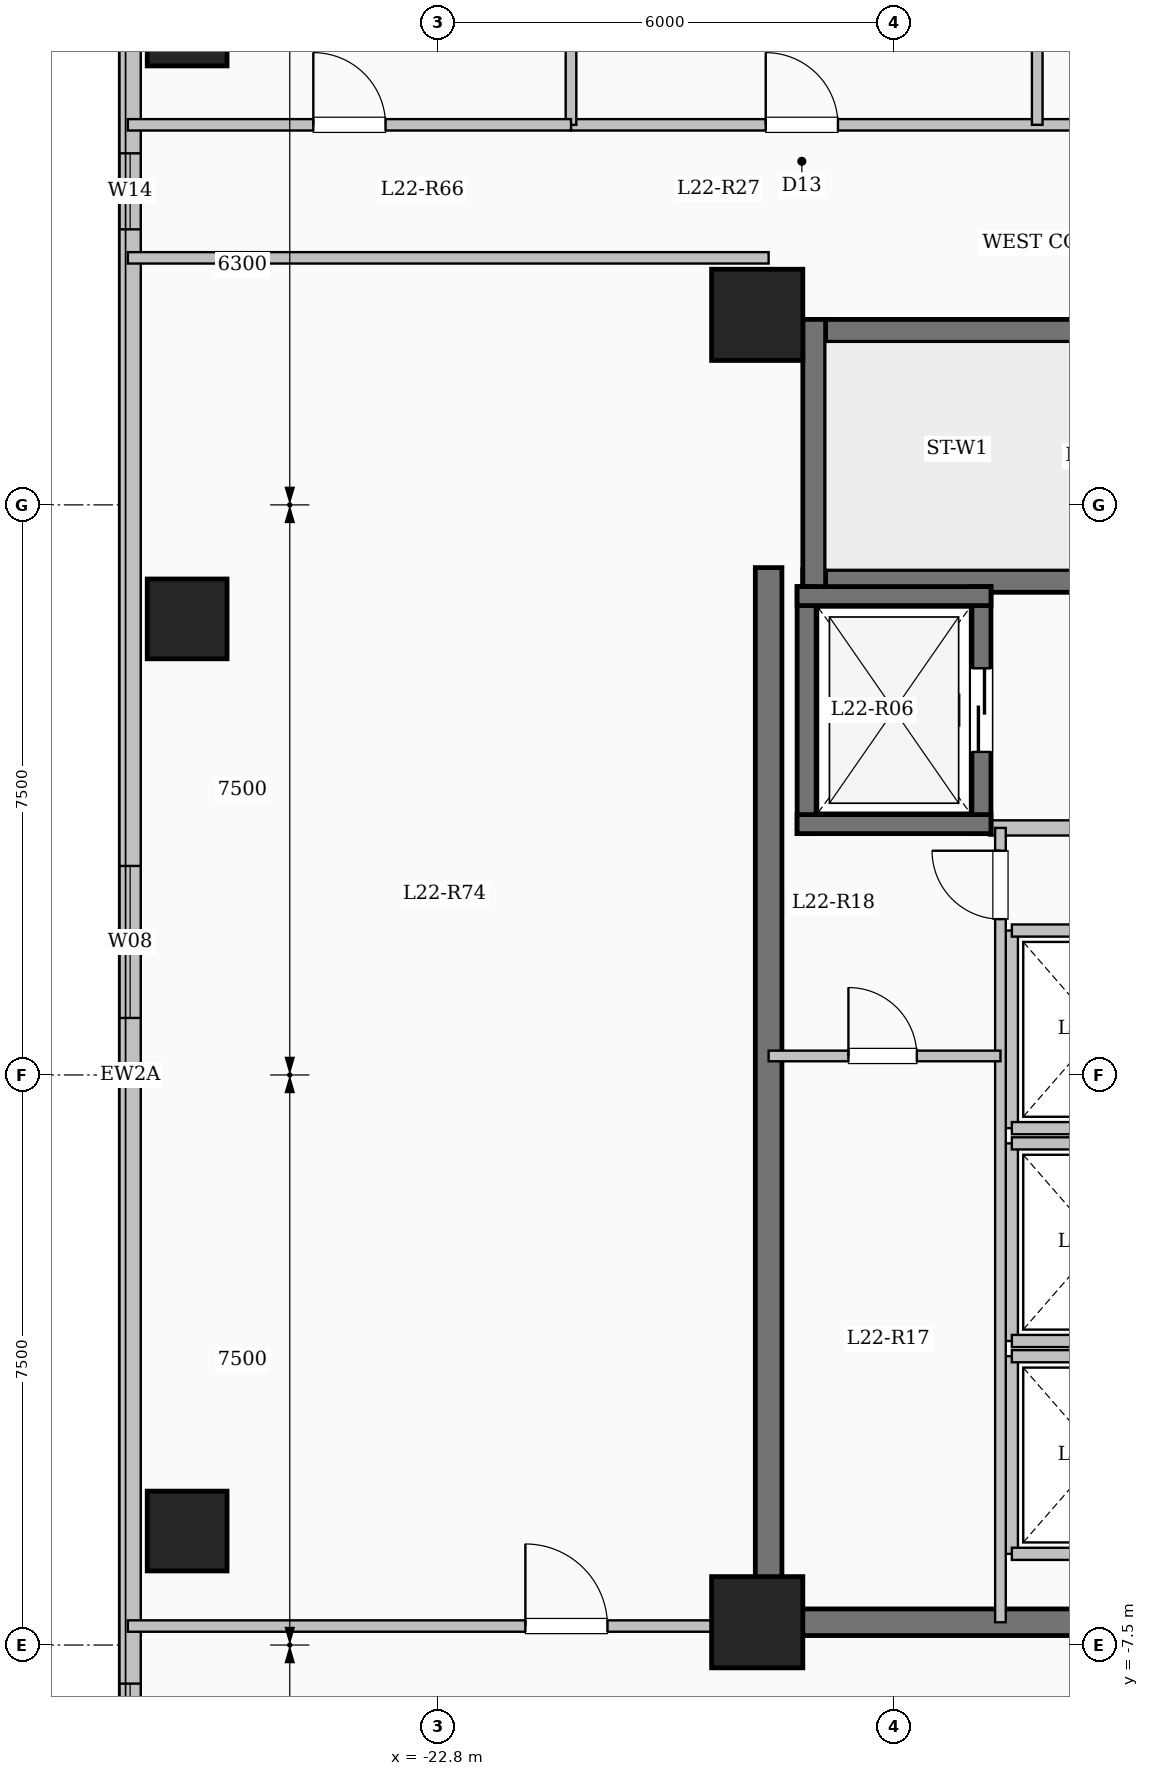
"""IFC4 building model, lengths in metres.
Left out: names, types, materials, properties, quantities, classifications, styles, units other than length and angle.
Written with IfcOpenShell. Run it as: python <this file> out.ifc"""

import sys

from ifc_helpers import new_model, si_unit, direction, frame, frame_2d, origin, origin_2d, place, context, subcontext, project, spatial, rectangle, extrude, element, fill, save


model = new_model("IFC4")
c1 = context("Model", 3, precision=1e-05, world=origin(), true_north=direction((0.0, 1.0)))
c2 = subcontext(c1, "Body", "Model", "MODEL_VIEW")
j1 = project(units=[si_unit("LENGTHUNIT", "METRE"), si_unit("PLANEANGLEUNIT", "RADIAN")], contexts=[c1])
p1 = place(None, origin())
s1 = spatial("IfcSite", under=j1, at=p1, CompositionType="ELEMENT")
p2 = place(p1, origin())
s2 = spatial("IfcBuilding", under=s1, at=p2, CompositionType="ELEMENT")
p3 = place(p2, frame((0.0, 0.0, 85.0)))
s3 = spatial("IfcBuildingStorey", under=s2, at=p3, CompositionType="ELEMENT", Elevation=85.0)
for number, where, z_axis, x_axis in (
    (1, (-18.6, -7.2, 0.0), (0.0, 0.0, 1.0), (1.0, 0.0, 0.0)),
    (2, (-18.6, 10.0, 0.0), (0.0, 0.0, 1.0), (1.0, 0.0, 0.0)),
):
    element("IfcColumn", number, at=place(p3, frame(where, z_axis=z_axis, x_axis=x_axis)), inside=s3, PredefinedType="COLUMN", context=c2, shape_type="SweptSolid", body=[
        extrude(rectangle(XDim=1.2, YDim=1.2, at=origin_2d()), origin(), (0.0, 0.0, 1.0), 3.35),
    ])
for number, where, z_axis, x_axis in (
    (3, (-26.1, -6.0, 0.0), (0.0, 0.0, 1.0), (1.0, 0.0, 0.0)),
    (4, (-26.1, 6.0, 0.0), (0.0, 0.0, 1.0), (1.0, 0.0, 0.0)),
    (5, (-26.1, 13.8, 0.0), (0.0, 0.0, 1.0), (1.0, 0.0, 0.0)),
):
    element("IfcColumn", number, at=place(p3, frame(where, z_axis=z_axis, x_axis=x_axis)), inside=s3, PredefinedType="COLUMN", context=c2, shape_type="SweptSolid", body=[
        extrude(rectangle(XDim=1.05, YDim=1.05, at=origin_2d()), origin(), (0.0, 0.0, 1.0), 3.35),
    ])
p4 = place(p3, frame((-26.85, -17.85, 0.0), z_axis=(0.0, 0.0, 1.0), x_axis=(0.0, 1.0, 0.0)))
e6 = element("IfcWall", 6, at=p4, inside=s3, PredefinedType="SOLIDWALL", context=c2, shape_type="SweptSolid", body=[
    extrude(rectangle(XDim=35.7, YDim=0.28, at=frame_2d((17.85, 0.0))), origin(), (0.0, 0.0, 1.0), 3.1),
])
p5 = place(p4, frame((2.55, 0.0, 0.9)))
e7 = element("IfcOpeningElement", 7, at=p5, cuts=e6, PredefinedType="OPENING", context=c2, shape_type="SweptSolid", body=[
    extrude(rectangle(XDim=2.4, YDim=1.8, at=frame_2d((1.2, 0.9))), frame((0.0, 0.15, 0.0), z_axis=(0.0, -1.0, 0.0), x_axis=(1.0, 0.0, 0.0)), (0.0, 0.0, 1.0), 0.3),
])
p6 = place(p4, frame((8.343, 0.0, 0.9)))
e8 = element("IfcOpeningElement", 8, at=p6, cuts=e6, PredefinedType="OPENING", context=c2, shape_type="SweptSolid", body=[
    extrude(rectangle(XDim=1.5, YDim=1.65, at=frame_2d((0.75, 0.825))), frame((0.0, 0.15, 0.0), z_axis=(0.0, -1.0, 0.0), x_axis=(1.0, 0.0, 0.0)), (0.0, 0.0, 1.0), 0.3),
])
p7 = place(p4, frame((18.6, 0.0, 0.9)))
e9 = element("IfcOpeningElement", 9, at=p7, cuts=e6, PredefinedType="OPENING", context=c2, shape_type="SweptSolid", body=[
    extrude(rectangle(XDim=2.0, YDim=1.7, at=frame_2d((1.0, 0.85))), frame((0.0, 0.15, 0.0), z_axis=(0.0, -1.0, 0.0), x_axis=(1.0, 0.0, 0.0)), (0.0, 0.0, 1.0), 0.3),
])
p8 = place(p4, frame((28.975, 0.0, 0.95)))
e10 = element("IfcOpeningElement", 10, at=p8, cuts=e6, PredefinedType="OPENING", context=c2, shape_type="SweptSolid", body=[
    extrude(rectangle(XDim=1.0, YDim=1.5, at=frame_2d((0.5, 0.75))), frame((0.0, 0.15, 0.0), z_axis=(0.0, -1.0, 0.0), x_axis=(1.0, 0.0, 0.0)), (0.0, 0.0, 1.0), 0.3),
])
p9 = place(p4, frame((32.025, 0.0, 0.9)))
e11 = element("IfcOpeningElement", 11, at=p9, cuts=e6, PredefinedType="OPENING", context=c2, shape_type="SweptSolid", body=[
    extrude(rectangle(XDim=2.0, YDim=1.7, at=frame_2d((1.0, 0.85))), frame((0.0, 0.15, 0.0), z_axis=(0.0, -1.0, 0.0), x_axis=(1.0, 0.0, 0.0)), (0.0, 0.0, 1.0), 0.3),
])
p10 = place(p3, frame((-18.0, 9.79, 0.0), z_axis=(0.0, 0.0, 1.0), x_axis=(1.0, 0.0, 0.0)))
e12 = element("IfcWall", 12, at=p10, inside=s3, PredefinedType="SHEAR", context=c2, shape_type="SweptSolid", body=[
    extrude(rectangle(XDim=8.0, YDim=0.3, at=frame_2d((4.0, 0.0))), origin(), (0.0, 0.0, 1.0), 3.35),
])
p11 = place(p3, frame((-18.0, 6.5, 0.0), z_axis=(0.0, 0.0, 1.0), x_axis=(1.0, 0.0, 0.0)))
e13 = element("IfcWall", 13, at=p11, inside=s3, PredefinedType="SHEAR", context=c2, shape_type="SweptSolid", body=[
    extrude(rectangle(XDim=8.0, YDim=0.3, at=frame_2d((4.0, 0.0))), origin(), (0.0, 0.0, 1.0), 3.35),
])
p12 = place(p11, frame((6.45, 0.0, 0.0)))
e14 = element("IfcOpeningElement", 14, at=p12, cuts=e13, PredefinedType="OPENING", context=c2, shape_type="SweptSolid", body=[
    extrude(rectangle(XDim=1.0, YDim=2.15, at=frame_2d((0.5, 1.075))), frame((0.0, 0.16, 0.0), z_axis=(0.0, -1.0, 0.0), x_axis=(1.0, 0.0, 0.0)), (0.0, 0.0, 1.0), 0.32),
])
p13 = place(p3, frame((-17.85, 6.35, 0.0), z_axis=(0.0, 0.0, 1.0), x_axis=(0.0, 1.0, 0.0)))
e15 = element("IfcWall", 15, at=p13, inside=s3, PredefinedType="SHEAR", context=c2, shape_type="SweptSolid", body=[
    extrude(rectangle(XDim=3.59, YDim=0.3, at=frame_2d((1.795, 0.0))), origin(), (0.0, 0.0, 1.0), 3.35),
])
p14 = place(p3, frame((-15.55, 3.25, 0.0), z_axis=(0.0, 0.0, 1.0), x_axis=(1.0, 0.0, 0.0)))
e16 = element("IfcWall", 16, at=p14, inside=s3, PredefinedType="SOLIDWALL", context=c2, shape_type="SweptSolid", body=[
    extrude(rectangle(XDim=5.4, YDim=0.2, at=frame_2d((2.7, 0.0))), origin(), (0.0, 0.0, 1.0), 3.1),
])
p15 = place(p3, frame((-17.95, 3.175, 0.0), z_axis=(0.0, 0.0, 1.0), x_axis=(0.0, 1.0, 0.0)))
e17 = element("IfcWall", 17, at=p15, inside=s3, PredefinedType="SHEAR", context=c2, shape_type="SweptSolid", body=[
    extrude(rectangle(XDim=3.25, YDim=0.25, at=frame_2d((1.625, 0.0))), origin(), (0.0, 0.0, 1.0), 3.35),
])
p16 = place(p3, frame((-15.65, 3.175, 0.0), z_axis=(0.0, 0.0, 1.0), x_axis=(0.0, 1.0, 0.0)))
e18 = element("IfcWall", 18, at=p16, inside=s3, PredefinedType="SHEAR", context=c2, shape_type="SweptSolid", body=[
    extrude(rectangle(XDim=3.25, YDim=0.25, at=frame_2d((1.625, 0.0))), origin(), (0.0, 0.0, 1.0), 3.35),
])
p17 = place(p16, frame((1.075, 0.0, 0.0)))
e19 = element("IfcOpeningElement", 19, at=p17, cuts=e18, PredefinedType="OPENING", context=c2, shape_type="SweptSolid", body=[
    extrude(rectangle(XDim=1.1, YDim=2.15, at=frame_2d((0.55, 1.075))), frame((0.0, 0.135, 0.0), z_axis=(0.0, -1.0, 0.0), x_axis=(1.0, 0.0, 0.0)), (0.0, 0.0, 1.0), 0.27),
])
for number, where, z_axis, x_axis in (
    (20, (-18.075, 3.3, 0.0), (0.0, 0.0, 1.0), (1.0, 0.0, 0.0)),
    (21, (-18.075, 6.3, 0.0), (0.0, 0.0, 1.0), (1.0, 0.0, 0.0)),
):
    element("IfcWall", number, at=place(p3, frame(where, z_axis=z_axis, x_axis=x_axis)), inside=s3, PredefinedType="SHEAR", context=c2, shape_type="SweptSolid", body=[
        extrude(rectangle(XDim=2.55, YDim=0.25, at=frame_2d((1.275, 0.0))), origin(), (0.0, 0.0, 1.0), 3.35),
    ])
p18 = place(p3, frame((-15.25, -6.3, 0.0), z_axis=(0.0, 0.0, 1.0), x_axis=(0.0, 1.0, 0.0)))
e22 = element("IfcWall", 22, at=p18, inside=s3, PredefinedType="SOLIDWALL", context=c2, shape_type="SweptSolid", body=[
    extrude(rectangle(XDim=2.6, YDim=0.16, at=frame_2d((1.3, 0.0))), origin(), (0.0, 0.0, 1.0), 3.1),
])
for number, where, z_axis, x_axis in (
    (23, (-15.25, -6.3, 0.0), (0.0, 0.0, 1.0), (1.0, 0.0, 0.0)),
    (24, (-15.25, -3.7, 0.0), (0.0, 0.0, 1.0), (1.0, 0.0, 0.0)),
):
    element("IfcWall", number, at=place(p3, frame(where, z_axis=z_axis, x_axis=x_axis)), inside=s3, PredefinedType="SOLIDWALL", context=c2, shape_type="SweptSolid", body=[
        extrude(rectangle(XDim=2.3, YDim=0.16, at=frame_2d((1.15, 0.0))), origin(), (0.0, 0.0, 1.0), 3.1),
    ])
p19 = place(p3, frame((-15.25, -3.5, 0.0), z_axis=(0.0, 0.0, 1.0), x_axis=(0.0, 1.0, 0.0)))
e25 = element("IfcWall", 25, at=p19, inside=s3, PredefinedType="SOLIDWALL", context=c2, shape_type="SweptSolid", body=[
    extrude(rectangle(XDim=2.6, YDim=0.16, at=frame_2d((1.3, 0.0))), origin(), (0.0, 0.0, 1.0), 3.1),
])
for number, where, z_axis, x_axis in (
    (26, (-15.25, -3.5, 0.0), (0.0, 0.0, 1.0), (1.0, 0.0, 0.0)),
    (27, (-15.25, -0.9, 0.0), (0.0, 0.0, 1.0), (1.0, 0.0, 0.0)),
):
    element("IfcWall", number, at=place(p3, frame(where, z_axis=z_axis, x_axis=x_axis)), inside=s3, PredefinedType="SOLIDWALL", context=c2, shape_type="SweptSolid", body=[
        extrude(rectangle(XDim=2.3, YDim=0.16, at=frame_2d((1.15, 0.0))), origin(), (0.0, 0.0, 1.0), 3.1),
    ])
p20 = place(p3, frame((-15.25, -0.7, 0.0), z_axis=(0.0, 0.0, 1.0), x_axis=(0.0, 1.0, 0.0)))
e28 = element("IfcWall", 28, at=p20, inside=s3, PredefinedType="SOLIDWALL", context=c2, shape_type="SweptSolid", body=[
    extrude(rectangle(XDim=2.6, YDim=0.16, at=frame_2d((1.3, 0.0))), origin(), (0.0, 0.0, 1.0), 3.1),
])
for number, where, z_axis, x_axis in (
    (29, (-15.25, -0.7, 0.0), (0.0, 0.0, 1.0), (1.0, 0.0, 0.0)),
    (30, (-15.25, 1.9, 0.0), (0.0, 0.0, 1.0), (1.0, 0.0, 0.0)),
):
    element("IfcWall", number, at=place(p3, frame(where, z_axis=z_axis, x_axis=x_axis)), inside=s3, PredefinedType="SOLIDWALL", context=c2, shape_type="SweptSolid", body=[
        extrude(rectangle(XDim=2.3, YDim=0.16, at=frame_2d((1.15, 0.0))), origin(), (0.0, 0.0, 1.0), 3.1),
    ])
p21 = place(p3, frame((-18.45, -7.375, 0.0), z_axis=(0.0, 0.0, 1.0), x_axis=(0.0, 1.0, 0.0)))
e31 = element("IfcWall", 31, at=p21, inside=s3, PredefinedType="SHEAR", context=c2, shape_type="SweptSolid", body=[
    extrude(rectangle(XDim=14.05, YDim=0.35, at=frame_2d((7.025, 0.0))), origin(), (0.0, 0.0, 1.0), 3.35),
])
p22 = place(p3, frame((-18.625, -7.2, 0.0), z_axis=(0.0, 0.0, 1.0), x_axis=(1.0, 0.0, 0.0)))
e32 = element("IfcWall", 32, at=p22, inside=s3, PredefinedType="SHEAR", context=c2, shape_type="SweptSolid", body=[
    extrude(rectangle(XDim=8.55, YDim=0.35, at=frame_2d((4.275, 0.0))), origin(), (0.0, 0.0, 1.0), 3.35),
])
p23 = place(p3, frame((-15.4, -7.2, 0.0), z_axis=(0.0, 0.0, 1.0), x_axis=(0.0, 1.0, 0.0)))
e33 = element("IfcWall", 33, at=p23, inside=s3, PredefinedType="PARTITIONING", context=c2, shape_type="SweptSolid", body=[
    extrude(rectangle(XDim=10.45, YDim=0.14, at=frame_2d((5.225, 0.0))), origin(), (0.0, 0.0, 1.0), 3.1),
])
p24 = place(p23, frame((9.25, 0.0, 0.0)))
e34 = element("IfcOpeningElement", 34, at=p24, cuts=e33, PredefinedType="OPENING", context=c2, shape_type="SweptSolid", body=[
    extrude(rectangle(XDim=0.9, YDim=2.08, at=frame_2d((0.45, 1.04))), frame((0.0, 0.08, 0.0), z_axis=(0.0, -1.0, 0.0), x_axis=(1.0, 0.0, 0.0)), (0.0, 0.0, 1.0), 0.16),
])
p25 = place(p3, frame((-18.45, 0.25, 0.0), z_axis=(0.0, 0.0, 1.0), x_axis=(1.0, 0.0, 0.0)))
e35 = element("IfcWall", 35, at=p25, inside=s3, PredefinedType="PARTITIONING", context=c2, shape_type="SweptSolid", body=[
    extrude(rectangle(XDim=3.05, YDim=0.14, at=frame_2d((1.525, 0.0))), origin(), (0.0, 0.0, 1.0), 3.1),
])
p26 = place(p25, frame((1.05, 0.0, 0.0)))
e36 = element("IfcOpeningElement", 36, at=p26, cuts=e35, PredefinedType="OPENING", context=c2, shape_type="SweptSolid", body=[
    extrude(rectangle(XDim=0.9, YDim=2.08, at=frame_2d((0.45, 1.04))), frame((0.0, 0.08, 0.0), z_axis=(0.0, -1.0, 0.0), x_axis=(1.0, 0.0, 0.0)), (0.0, 0.0, 1.0), 0.16),
])
p27 = place(p3, frame((-21.05, 12.5, 0.0), z_axis=(0.0, 0.0, 1.0), x_axis=(1.0, 0.0, 0.0)))
e37 = element("IfcWall", 37, at=p27, inside=s3, PredefinedType="PARTITIONING", context=c2, shape_type="SweptSolid", body=[
    extrude(rectangle(XDim=17.2, YDim=0.15, at=frame_2d((8.6, 0.0))), origin(), (0.0, 0.0, 1.0), 3.1),
])
p28 = place(p27, frame((2.562, 0.0, 0.0)))
e38 = element("IfcOpeningElement", 38, at=p28, cuts=e37, PredefinedType="OPENING", context=c2, shape_type="SweptSolid", body=[
    extrude(rectangle(XDim=0.95, YDim=2.15, at=frame_2d((0.475, 1.075))), frame((0.0, 0.085, 0.0), z_axis=(0.0, -1.0, 0.0), x_axis=(1.0, 0.0, 0.0)), (0.0, 0.0, 1.0), 0.17),
])
p29 = place(p27, frame((8.726, 0.0, 0.0)))
e39 = element("IfcOpeningElement", 39, at=p29, cuts=e37, PredefinedType="OPENING", context=c2, shape_type="SweptSolid", body=[
    extrude(rectangle(XDim=0.95, YDim=2.15, at=frame_2d((0.475, 1.075))), frame((0.0, 0.085, 0.0), z_axis=(0.0, -1.0, 0.0), x_axis=(1.0, 0.0, 0.0)), (0.0, 0.0, 1.0), 0.17),
])
p30 = place(p27, frame((14.21, 0.0, 0.0)))
e40 = element("IfcOpeningElement", 40, at=p30, cuts=e37, PredefinedType="OPENING", context=c2, shape_type="SweptSolid", body=[
    extrude(rectangle(XDim=0.95, YDim=2.15, at=frame_2d((0.475, 1.075))), frame((0.0, 0.085, 0.0), z_axis=(0.0, -1.0, 0.0), x_axis=(1.0, 0.0, 0.0)), (0.0, 0.0, 1.0), 0.17),
])
p31 = place(p3, frame((-14.916, 12.5, 0.0), z_axis=(0.0, 0.0, 1.0), x_axis=(0.0, 1.0, 0.0)))
e41 = element("IfcWall", 41, at=p31, inside=s3, PredefinedType="PARTITIONING", context=c2, shape_type="SweptSolid", body=[
    extrude(rectangle(XDim=9.55, YDim=0.14, at=frame_2d((4.775, 0.0))), origin(), (0.0, 0.0, 1.0), 2.435),
])
p32 = place(p3, frame((-26.88, -7.25, 0.0), z_axis=(0.0, 0.0, 1.0), x_axis=(1.0, 0.0, 0.0)))
e42 = element("IfcWall", 42, at=p32, inside=s3, PredefinedType="PARTITIONING", context=c2, shape_type="SweptSolid", body=[
    extrude(rectangle(XDim=8.43, YDim=0.15, at=frame_2d((4.215, 0.0))), origin(), (0.0, 0.0, 1.0), 3.1),
])
p33 = place(p32, frame((5.23, 0.0, 0.0)))
e43 = element("IfcOpeningElement", 43, at=p33, cuts=e42, PredefinedType="OPENING", context=c2, shape_type="SweptSolid", body=[
    extrude(rectangle(XDim=1.08, YDim=2.15, at=frame_2d((0.54, 1.075))), frame((0.0, 0.085, 0.0), z_axis=(0.0, -1.0, 0.0), x_axis=(1.0, 0.0, 0.0)), (0.0, 0.0, 1.0), 0.17),
])
p34 = place(p3, frame((-26.88, 10.75, 0.0), z_axis=(0.0, 0.0, 1.0), x_axis=(1.0, 0.0, 0.0)))
e44 = element("IfcWall", 44, at=p34, inside=s3, PredefinedType="PARTITIONING", context=c2, shape_type="SweptSolid", body=[
    extrude(rectangle(XDim=8.43, YDim=0.15, at=frame_2d((4.215, 0.0))), origin(), (0.0, 0.0, 1.0), 3.1),
])
p35 = place(p3, frame((-21.05, 12.5, 0.0), z_axis=(0.0, 0.0, 1.0), x_axis=(0.0, 1.0, 0.0)))
e45 = element("IfcWall", 45, at=p35, inside=s3, PredefinedType="PARTITIONING", context=c2, shape_type="SweptSolid", body=[
    extrude(rectangle(XDim=5.35, YDim=0.14, at=frame_2d((2.675, 0.0))), origin(), (0.0, 0.0, 1.0), 3.1),
])
p36 = place(p3, frame((-26.88, 12.5, 0.0), z_axis=(0.0, 0.0, 1.0), x_axis=(1.0, 0.0, 0.0)))
e46 = element("IfcWall", 46, at=p36, inside=s3, PredefinedType="PARTITIONING", context=c2, shape_type="SweptSolid", body=[
    extrude(rectangle(XDim=5.83, YDim=0.15, at=frame_2d((2.915, 0.0))), origin(), (0.0, 0.0, 1.0), 3.1),
])
p37 = place(p36, frame((2.44, 0.0, 0.0)))
e47 = element("IfcOpeningElement", 47, at=p37, cuts=e46, PredefinedType="OPENING", context=c2, shape_type="SweptSolid", body=[
    extrude(rectangle(XDim=0.95, YDim=2.15, at=frame_2d((0.475, 1.075))), frame((0.0, 0.085, 0.0), z_axis=(0.0, -1.0, 0.0), x_axis=(1.0, 0.0, 0.0)), (0.0, 0.0, 1.0), 0.17),
])
p38 = place(p6, origin())
e48 = element("IfcWindow", 48, at=p38, inside=s3, PartitioningType="SINGLE_PANEL", PredefinedType="WINDOW", context=c2, shape_type="SweptSolid", body=[
    extrude(rectangle(XDim=1.5, YDim=1.65, at=frame_2d((0.75, 0.825))), frame((0.0, 0.03, 0.0), z_axis=(0.0, -1.0, 0.0), x_axis=(1.0, 0.0, 0.0)), (0.0, 0.0, 1.0), 0.06),
])
fill(e8, e48)
p39 = place(p7, origin())
e49 = element("IfcWindow", 49, at=p39, inside=s3, PartitioningType="SINGLE_PANEL", PredefinedType="WINDOW", context=c2, shape_type="SweptSolid", body=[
    extrude(rectangle(XDim=2.0, YDim=1.7, at=frame_2d((1.0, 0.85))), frame((0.0, 0.03, 0.0), z_axis=(0.0, -1.0, 0.0), x_axis=(1.0, 0.0, 0.0)), (0.0, 0.0, 1.0), 0.06),
])
fill(e9, e49)
p40 = place(p8, origin())
e50 = element("IfcWindow", 50, at=p40, inside=s3, PartitioningType="SINGLE_PANEL", PredefinedType="WINDOW", context=c2, shape_type="SweptSolid", body=[
    extrude(rectangle(XDim=1.0, YDim=1.5, at=frame_2d((0.5, 0.75))), frame((0.0, 0.03, 0.0), z_axis=(0.0, -1.0, 0.0), x_axis=(1.0, 0.0, 0.0)), (0.0, 0.0, 1.0), 0.06),
])
fill(e10, e50)
p41 = place(p17, origin())
e51 = element("IfcDoor", 51, at=p41, inside=s3, OperationType="SLIDING_TO_LEFT", PredefinedType="DOOR", context=c2, shape_type="SweptSolid", body=[
    extrude(rectangle(XDim=1.1, YDim=2.15, at=frame_2d((0.55, 1.075))), frame((0.0, 0.025, 0.0), z_axis=(0.0, -1.0, 0.0), x_axis=(1.0, 0.0, 0.0)), (0.0, 0.0, 1.0), 0.05),
])
fill(e19, e51)
p42 = place(p24, origin())
e52 = element("IfcDoor", 52, at=p42, inside=s3, OperationType="SINGLE_SWING_RIGHT", PredefinedType="DOOR", context=c2, shape_type="SweptSolid", body=[
    extrude(rectangle(XDim=0.9, YDim=2.08, at=frame_2d((0.45, 1.04))), frame((0.0, 0.025, 0.0), z_axis=(0.0, -1.0, 0.0), x_axis=(1.0, 0.0, 0.0)), (0.0, 0.0, 1.0), 0.05),
])
fill(e34, e52)
p43 = place(p26, origin())
e53 = element("IfcDoor", 53, at=p43, inside=s3, OperationType="SINGLE_SWING_LEFT", PredefinedType="DOOR", context=c2, shape_type="SweptSolid", body=[
    extrude(rectangle(XDim=0.9, YDim=2.08, at=frame_2d((0.45, 1.04))), frame((0.0, 0.025, 0.0), z_axis=(0.0, -1.0, 0.0), x_axis=(1.0, 0.0, 0.0)), (0.0, 0.0, 1.0), 0.05),
])
fill(e36, e53)
p44 = place(p28, origin())
e54 = element("IfcDoor", 54, at=p44, inside=s3, OperationType="SINGLE_SWING_LEFT", PredefinedType="DOOR", context=c2, shape_type="SweptSolid", body=[
    extrude(rectangle(XDim=0.95, YDim=2.15, at=frame_2d((0.475, 1.075))), frame((0.0, 0.025, 0.0), z_axis=(0.0, -1.0, 0.0), x_axis=(1.0, 0.0, 0.0)), (0.0, 0.0, 1.0), 0.05),
])
fill(e38, e54)
p45 = place(p37, origin())
e55 = element("IfcDoor", 55, at=p45, inside=s3, OperationType="SINGLE_SWING_LEFT", PredefinedType="DOOR", context=c2, shape_type="SweptSolid", body=[
    extrude(rectangle(XDim=0.95, YDim=2.15, at=frame_2d((0.475, 1.075))), frame((0.0, 0.025, 0.0), z_axis=(0.0, -1.0, 0.0), x_axis=(1.0, 0.0, 0.0)), (0.0, 0.0, 1.0), 0.05),
])
fill(e47, e55)
p46 = place(p33, origin())
e56 = element("IfcDoor", 56, at=p46, inside=s3, OperationType="SINGLE_SWING_LEFT", PredefinedType="DOOR", context=c2, shape_type="SweptSolid", body=[
    extrude(rectangle(XDim=1.08, YDim=2.15, at=frame_2d((0.54, 1.075))), frame((0.0, 0.025, 0.0), z_axis=(0.0, -1.0, 0.0), x_axis=(1.0, 0.0, 0.0)), (0.0, 0.0, 1.0), 0.05),
])
fill(e43, e56)
save(model, sys.argv[1])
